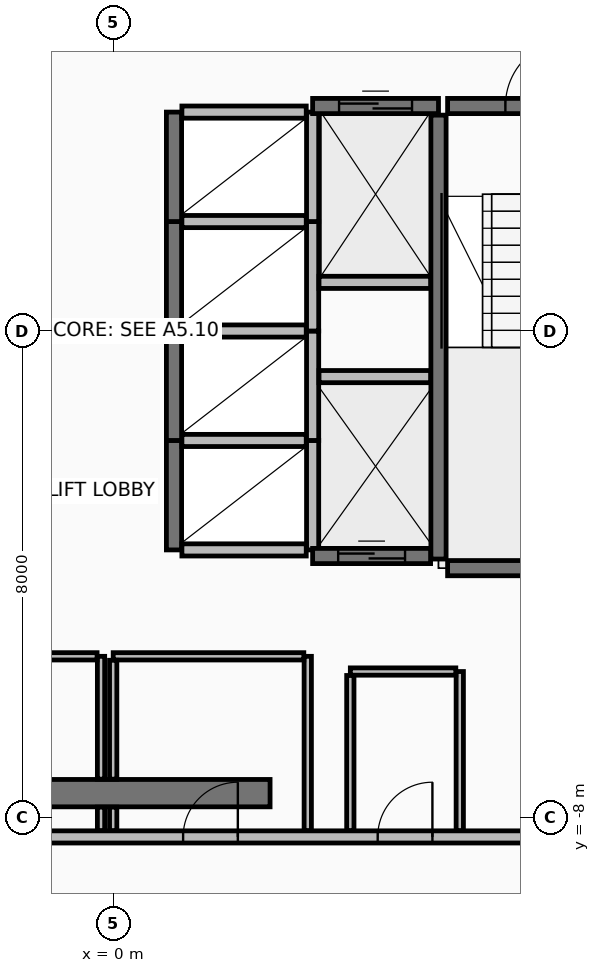
"""IFC4 building model, lengths in metres.
Left out: names, types, materials, properties, quantities, classifications, styles, units other than length and angle.
Written with IfcOpenShell. Run it as: python <this file> out.ifc"""

import sys

from ifc_helpers import new_model, si_unit, direction, frame, frame_2d, origin, place, context, subcontext, project, spatial, rectangle, extrude, element, fill, save


model = new_model("IFC4")
c1 = context("Model", 3, precision=1e-05, world=origin(), true_north=direction((0.0, 1.0)))
c2 = subcontext(c1, "Body", "Model", "MODEL_VIEW")
j1 = project(units=[si_unit("LENGTHUNIT", "METRE"), si_unit("PLANEANGLEUNIT", "RADIAN")], contexts=[c1])
p1 = place(None, origin())
s1 = spatial("IfcSite", under=j1, at=p1, CompositionType="ELEMENT")
p2 = place(p1, origin())
s2 = spatial("IfcBuilding", under=s1, at=p2, CompositionType="ELEMENT")
p3 = place(p2, frame((0.0, 0.0, 218.45)))
s3 = spatial("IfcBuildingStorey", under=s2, at=p3, CompositionType="ELEMENT", Elevation=218.45)
p4 = place(p3, frame((-2.8, -7.6, 0.0), z_axis=(0.0, 0.0, 1.0), x_axis=(1.0, 0.0, 0.0)))
e1 = element("IfcWall", 1, at=p4, inside=s3, PredefinedType="SHEAR", context=c2, shape_type="SweptSolid", body=[
    extrude(rectangle(XDim=5.38, YDim=0.45, at=frame_2d((2.69, 0.0))), origin(), (0.0, 0.0, 1.0), 3.36),
])
p5 = place(p3, frame((-9.62, -8.32, 0.0), z_axis=(0.0, 0.0, 1.0), x_axis=(1.0, 0.0, 0.0)))
e2 = element("IfcWall", 2, at=p5, inside=s3, PredefinedType="PARTITIONING", context=c2, shape_type="SweptSolid", body=[
    extrude(rectangle(XDim=19.24, YDim=0.2, at=frame_2d((9.62, 0.0))), origin(), (0.0, 0.0, 1.0), 2.805),
])
p6 = place(p5, frame((7.37, 0.0, 0.0)))
e3 = element("IfcOpeningElement", 3, at=p6, cuts=e2, PredefinedType="OPENING", context=c2, shape_type="SweptSolid", body=[
    extrude(rectangle(XDim=0.9, YDim=2.1, at=frame_2d((0.45, 1.05))), frame((0.0, 0.11, 0.0), z_axis=(0.0, -1.0, 0.0), x_axis=(1.0, 0.0, 0.0)), (0.0, 0.0, 1.0), 0.22),
])
p7 = place(p5, frame((10.77, 0.0, 0.0)))
e4 = element("IfcOpeningElement", 4, at=p7, cuts=e2, PredefinedType="OPENING", context=c2, shape_type="SweptSolid", body=[
    extrude(rectangle(XDim=0.9, YDim=2.1, at=frame_2d((0.45, 1.05))), frame((0.0, 0.11, 0.0), z_axis=(0.0, -1.0, 0.0), x_axis=(1.0, 0.0, 0.0)), (0.0, 0.0, 1.0), 0.22),
])
p8 = place(p5, frame((13.97, 0.0, 0.0)))
e5 = element("IfcOpeningElement", 5, at=p8, cuts=e2, PredefinedType="OPENING", context=c2, shape_type="SweptSolid", body=[
    extrude(rectangle(XDim=0.9, YDim=2.1, at=frame_2d((0.45, 1.05))), frame((0.0, 0.11, 0.0), z_axis=(0.0, -1.0, 0.0), x_axis=(1.0, 0.0, 0.0)), (0.0, 0.0, 1.0), 0.22),
])
p9 = place(p3, frame((5.35, -3.75, 0.0), z_axis=(0.0, 0.0, 1.0), x_axis=(0.0, 1.0, 0.0)))
e6 = element("IfcWall", 6, at=p9, inside=s3, PredefinedType="SHEAR", context=c2, shape_type="SweptSolid", body=[
    extrude(rectangle(XDim=7.3, YDim=0.25, at=frame_2d((3.65, 0.0))), origin(), (0.0, 0.0, 1.0), 3.36),
])
p10 = place(p3, frame((5.5, 3.7, 0.0), z_axis=(0.0, 0.0, 1.0), x_axis=(1.0, 0.0, 0.0)))
e7 = element("IfcWall", 7, at=p10, inside=s3, PredefinedType="SHEAR", context=c2, shape_type="SweptSolid", body=[
    extrude(rectangle(XDim=3.0, YDim=0.25, at=frame_2d((1.5, 0.0))), origin(), (0.0, 0.0, 1.0), 3.36),
])
p11 = place(p10, frame((0.95, 0.0, 0.0)))
e8 = element("IfcOpeningElement", 8, at=p11, cuts=e7, PredefinedType="OPENING", context=c2, shape_type="SweptSolid", body=[
    extrude(rectangle(XDim=1.1, YDim=2.15, at=frame_2d((0.55, 1.075))), frame((0.0, 0.135, 0.0), z_axis=(0.0, -1.0, 0.0), x_axis=(1.0, 0.0, 0.0)), (0.0, 0.0, 1.0), 0.27),
])
p12 = place(p3, frame((5.5, -3.9, 0.0), z_axis=(0.0, 0.0, 1.0), x_axis=(1.0, 0.0, 0.0)))
e9 = element("IfcWall", 9, at=p12, inside=s3, PredefinedType="SHEAR", context=c2, shape_type="SweptSolid", body=[
    extrude(rectangle(XDim=3.0, YDim=0.25, at=frame_2d((1.5, 0.0))), origin(), (0.0, 0.0, 1.0), 3.36),
])
p13 = place(p3, frame((1.0, -3.6, 0.0), z_axis=(0.0, 0.0, 1.0), x_axis=(0.0, 1.0, 0.0)))
e10 = element("IfcWall", 10, at=p13, inside=s3, PredefinedType="SHEAR", context=c2, shape_type="SweptSolid", body=[
    extrude(rectangle(XDim=1.8, YDim=0.25, at=frame_2d((0.9, 0.0))), origin(), (0.0, 0.0, 1.0), 3.36),
])
p14 = place(p3, frame((3.28, -3.6, 0.0), z_axis=(0.0, 0.0, 1.0), x_axis=(0.0, 1.0, 0.0)))
e11 = element("IfcWall", 11, at=p14, inside=s3, PredefinedType="PARTITIONING", context=c2, shape_type="SweptSolid", body=[
    extrude(rectangle(XDim=1.8, YDim=0.2, at=frame_2d((0.9, 0.0))), origin(), (0.0, 0.0, 1.0), 3.36),
])
for number, where, z_axis, x_axis in (
    (12, (1.13, -3.6, 0.0), (0.0, 0.0, 1.0), (1.0, 0.0, 0.0)),
    (13, (1.13, -1.8, 0.0), (0.0, 0.0, 1.0), (1.0, 0.0, 0.0)),
):
    element("IfcWall", number, at=place(p3, frame(where, z_axis=z_axis, x_axis=x_axis)), inside=s3, PredefinedType="PARTITIONING", context=c2, shape_type="SweptSolid", body=[
        extrude(rectangle(XDim=2.045, YDim=0.2, at=frame_2d((1.022, 0.0))), origin(), (0.0, 0.0, 1.0), 3.36),
    ])
p15 = place(p3, frame((1.0, -1.8, 0.0), z_axis=(0.0, 0.0, 1.0), x_axis=(0.0, 1.0, 0.0)))
e14 = element("IfcWall", 14, at=p15, inside=s3, PredefinedType="SHEAR", context=c2, shape_type="SweptSolid", body=[
    extrude(rectangle(XDim=1.8, YDim=0.25, at=frame_2d((0.9, 0.0))), origin(), (0.0, 0.0, 1.0), 3.36),
])
p16 = place(p3, frame((3.28, -1.8, 0.0), z_axis=(0.0, 0.0, 1.0), x_axis=(0.0, 1.0, 0.0)))
e15 = element("IfcWall", 15, at=p16, inside=s3, PredefinedType="PARTITIONING", context=c2, shape_type="SweptSolid", body=[
    extrude(rectangle(XDim=1.8, YDim=0.2, at=frame_2d((0.9, 0.0))), origin(), (0.0, 0.0, 1.0), 3.36),
])
p17 = place(p3, frame((1.13, 0.0, 0.0), z_axis=(0.0, 0.0, 1.0), x_axis=(1.0, 0.0, 0.0)))
e16 = element("IfcWall", 16, at=p17, inside=s3, PredefinedType="PARTITIONING", context=c2, shape_type="SweptSolid", body=[
    extrude(rectangle(XDim=2.045, YDim=0.2, at=frame_2d((1.022, 0.0))), origin(), (0.0, 0.0, 1.0), 3.36),
])
p18 = place(p3, frame((1.0, 0.0, 0.0), z_axis=(0.0, 0.0, 1.0), x_axis=(0.0, 1.0, 0.0)))
e17 = element("IfcWall", 17, at=p18, inside=s3, PredefinedType="SHEAR", context=c2, shape_type="SweptSolid", body=[
    extrude(rectangle(XDim=1.8, YDim=0.25, at=frame_2d((0.9, 0.0))), origin(), (0.0, 0.0, 1.0), 3.36),
])
p19 = place(p3, frame((3.28, 0.0, 0.0), z_axis=(0.0, 0.0, 1.0), x_axis=(0.0, 1.0, 0.0)))
e18 = element("IfcWall", 18, at=p19, inside=s3, PredefinedType="PARTITIONING", context=c2, shape_type="SweptSolid", body=[
    extrude(rectangle(XDim=1.8, YDim=0.2, at=frame_2d((0.9, 0.0))), origin(), (0.0, 0.0, 1.0), 3.36),
])
p20 = place(p3, frame((1.13, 1.8, 0.0), z_axis=(0.0, 0.0, 1.0), x_axis=(1.0, 0.0, 0.0)))
e19 = element("IfcWall", 19, at=p20, inside=s3, PredefinedType="PARTITIONING", context=c2, shape_type="SweptSolid", body=[
    extrude(rectangle(XDim=2.045, YDim=0.2, at=frame_2d((1.022, 0.0))), origin(), (0.0, 0.0, 1.0), 3.36),
])
p21 = place(p3, frame((1.0, 1.8, 0.0), z_axis=(0.0, 0.0, 1.0), x_axis=(0.0, 1.0, 0.0)))
e20 = element("IfcWall", 20, at=p21, inside=s3, PredefinedType="SHEAR", context=c2, shape_type="SweptSolid", body=[
    extrude(rectangle(XDim=1.8, YDim=0.25, at=frame_2d((0.9, 0.0))), origin(), (0.0, 0.0, 1.0), 3.36),
])
p22 = place(p3, frame((3.28, 1.8, 0.0), z_axis=(0.0, 0.0, 1.0), x_axis=(0.0, 1.0, 0.0)))
e21 = element("IfcWall", 21, at=p22, inside=s3, PredefinedType="PARTITIONING", context=c2, shape_type="SweptSolid", body=[
    extrude(rectangle(XDim=1.8, YDim=0.2, at=frame_2d((0.9, 0.0))), origin(), (0.0, 0.0, 1.0), 3.36),
])
p23 = place(p3, frame((1.13, 3.6, 0.0), z_axis=(0.0, 0.0, 1.0), x_axis=(1.0, 0.0, 0.0)))
e22 = element("IfcWall", 22, at=p23, inside=s3, PredefinedType="PARTITIONING", context=c2, shape_type="SweptSolid", body=[
    extrude(rectangle(XDim=2.045, YDim=0.2, at=frame_2d((1.022, 0.0))), origin(), (0.0, 0.0, 1.0), 2.655),
])
p24 = place(p3, frame((3.28, 3.7, 0.0), z_axis=(0.0, 0.0, 1.0), x_axis=(1.0, 0.0, 0.0)))
e23 = element("IfcWall", 23, at=p24, inside=s3, PredefinedType="SHEAR", context=c2, shape_type="SweptSolid", body=[
    extrude(rectangle(XDim=2.07, YDim=0.25, at=frame_2d((1.035, 0.0))), origin(), (0.0, 0.0, 1.0), 3.36),
])
p25 = place(p24, frame((0.435, 0.0, 0.0)))
e24 = element("IfcOpeningElement", 24, at=p25, cuts=e23, PredefinedType="OPENING", context=c2, shape_type="SweptSolid", body=[
    extrude(rectangle(XDim=1.2, YDim=2.2, at=frame_2d((0.6, 1.1))), frame((0.0, 0.135, 0.0), z_axis=(0.0, -1.0, 0.0), x_axis=(1.0, 0.0, 0.0)), (0.0, 0.0, 1.0), 0.27),
])
p26 = place(p3, frame((3.385, 0.8, 0.0), z_axis=(0.0, 0.0, 1.0), x_axis=(1.0, 0.0, 0.0)))
e25 = element("IfcWall", 25, at=p26, inside=s3, PredefinedType="PARTITIONING", context=c2, shape_type="SweptSolid", body=[
    extrude(rectangle(XDim=1.835, YDim=0.2, at=frame_2d((0.917, 0.0))), origin(), (0.0, 0.0, 1.0), 3.36),
])
p27 = place(p3, frame((3.28, -3.7, 0.0), z_axis=(0.0, 0.0, 1.0), x_axis=(1.0, 0.0, 0.0)))
e26 = element("IfcWall", 26, at=p27, inside=s3, PredefinedType="SHEAR", context=c2, shape_type="SweptSolid", body=[
    extrude(rectangle(XDim=1.94, YDim=0.25, at=frame_2d((0.97, 0.0))), origin(), (0.0, 0.0, 1.0), 3.36),
])
p28 = place(p27, frame((0.42, 0.0, 0.0)))
e27 = element("IfcOpeningElement", 27, at=p28, cuts=e26, PredefinedType="OPENING", context=c2, shape_type="SweptSolid", body=[
    extrude(rectangle(XDim=1.1, YDim=2.2, at=frame_2d((0.55, 1.1))), frame((0.0, 0.135, 0.0), z_axis=(0.0, -1.0, 0.0), x_axis=(1.0, 0.0, 0.0)), (0.0, 0.0, 1.0), 0.27),
])
p29 = place(p3, frame((3.385, -0.75, 0.0), z_axis=(0.0, 0.0, 1.0), x_axis=(1.0, 0.0, 0.0)))
e28 = element("IfcWall", 28, at=p29, inside=s3, PredefinedType="PARTITIONING", context=c2, shape_type="SweptSolid", body=[
    extrude(rectangle(XDim=1.835, YDim=0.2, at=frame_2d((0.917, 0.0))), origin(), (0.0, 0.0, 1.0), 3.36),
])
p30 = place(p3, frame((-0.2, -8.215, 0.0), z_axis=(0.0, 0.0, 1.0), x_axis=(0.0, 1.0, 0.0)))
e29 = element("IfcWall", 29, at=p30, inside=s3, PredefinedType="PARTITIONING", context=c2, shape_type="SweptSolid", body=[
    extrude(rectangle(XDim=0.385, YDim=0.12, at=frame_2d((0.192, 0.0))), origin(), (0.0, 0.0, 1.0), 2.655),
])
p31 = place(p3, frame((-0.2, -7.37, 0.0), z_axis=(0.0, 0.0, 1.0), x_axis=(0.0, 1.0, 0.0)))
e30 = element("IfcWall", 30, at=p31, inside=s3, PredefinedType="PARTITIONING", context=c2, shape_type="SweptSolid", body=[
    extrude(rectangle(XDim=2.02, YDim=0.12, at=frame_2d((1.01, 0.0))), origin(), (0.0, 0.0, 1.0), 2.655),
])
p32 = place(p3, frame((-0.265, -5.35, 0.0), z_axis=(0.0, 0.0, 1.0), x_axis=(-1.0, 0.0, 0.0)))
e31 = element("IfcWall", 31, at=p32, inside=s3, PredefinedType="PARTITIONING", context=c2, shape_type="SweptSolid", body=[
    extrude(rectangle(XDim=3.135, YDim=0.12, at=frame_2d((1.567, 0.0))), origin(), (0.0, 0.0, 1.0), 2.655),
])
p33 = place(p3, frame((3.2, -8.215, 0.0), z_axis=(0.0, 0.0, 1.0), x_axis=(0.0, 1.0, 0.0)))
e32 = element("IfcWall", 32, at=p33, inside=s3, PredefinedType="PARTITIONING", context=c2, shape_type="SweptSolid", body=[
    extrude(rectangle(XDim=2.865, YDim=0.12, at=frame_2d((1.433, 0.0))), origin(), (0.0, 0.0, 1.0), 2.655),
])
p34 = place(p3, frame((3.135, -5.35, 0.0), z_axis=(0.0, 0.0, 1.0), x_axis=(-1.0, 0.0, 0.0)))
e33 = element("IfcWall", 33, at=p34, inside=s3, PredefinedType="PARTITIONING", context=c2, shape_type="SweptSolid", body=[
    extrude(rectangle(XDim=3.135, YDim=0.12, at=frame_2d((1.567, 0.0))), origin(), (0.0, 0.0, 1.0), 3.36),
])
p35 = place(p3, frame((0.0, -5.415, 0.0), z_axis=(0.0, 0.0, 1.0), x_axis=(0.0, -1.0, 0.0)))
e34 = element("IfcWall", 34, at=p35, inside=s3, PredefinedType="PARTITIONING", context=c2, shape_type="SweptSolid", body=[
    extrude(rectangle(XDim=1.955, YDim=0.12, at=frame_2d((0.978, 0.0))), origin(), (0.0, 0.0, 1.0), 2.655),
])
p36 = place(p3, frame((0.0, -7.83, 0.0), z_axis=(0.0, 0.0, 1.0), x_axis=(0.0, -1.0, 0.0)))
e35 = element("IfcWall", 35, at=p36, inside=s3, PredefinedType="PARTITIONING", context=c2, shape_type="SweptSolid", body=[
    extrude(rectangle(XDim=0.385, YDim=0.12, at=frame_2d((0.192, 0.0))), origin(), (0.0, 0.0, 1.0), 2.655),
])
p37 = place(p3, frame((5.7, -8.215, 0.0), z_axis=(0.0, 0.0, 1.0), x_axis=(0.0, 1.0, 0.0)))
e36 = element("IfcWall", 36, at=p37, inside=s3, PredefinedType="PARTITIONING", context=c2, shape_type="SweptSolid", body=[
    extrude(rectangle(XDim=2.615, YDim=0.12, at=frame_2d((1.308, 0.0))), origin(), (0.0, 0.0, 1.0), 2.655),
])
p38 = place(p3, frame((5.635, -5.6, 0.0), z_axis=(0.0, 0.0, 1.0), x_axis=(-1.0, 0.0, 0.0)))
e37 = element("IfcWall", 37, at=p38, inside=s3, PredefinedType="PARTITIONING", context=c2, shape_type="SweptSolid", body=[
    extrude(rectangle(XDim=1.735, YDim=0.12, at=frame_2d((0.868, 0.0))), origin(), (0.0, 0.0, 1.0), 3.36),
])
p39 = place(p3, frame((3.9, -5.665, 0.0), z_axis=(0.0, 0.0, 1.0), x_axis=(0.0, -1.0, 0.0)))
e38 = element("IfcWall", 38, at=p39, inside=s3, PredefinedType="PARTITIONING", context=c2, shape_type="SweptSolid", body=[
    extrude(rectangle(XDim=2.55, YDim=0.12, at=frame_2d((1.275, 0.0))), origin(), (0.0, 0.0, 1.0), 2.655),
])
p40 = place(p11, frame((1.1, 0.0, 0.0), z_axis=(0.0, 0.0, 1.0), x_axis=(-1.0, 0.0, 0.0)))
e39 = element("IfcDoor", 39, at=p40, inside=s3, OperationType="SINGLE_SWING_LEFT", PredefinedType="DOOR", context=c2, shape_type="SweptSolid", body=[
    extrude(rectangle(XDim=1.1, YDim=2.15, at=frame_2d((0.55, 1.075))), frame((0.0, 0.025, 0.0), z_axis=(0.0, -1.0, 0.0), x_axis=(1.0, 0.0, 0.0)), (0.0, 0.0, 1.0), 0.05),
])
fill(e8, e39)
p41 = place(p25, origin())
e40 = element("IfcDoor", 40, at=p41, inside=s3, OperationType="SLIDING_TO_RIGHT", PredefinedType="DOOR", context=c2, shape_type="SweptSolid", body=[
    extrude(rectangle(XDim=1.2, YDim=2.2, at=frame_2d((0.6, 1.1))), frame((0.0, 0.025, 0.0), z_axis=(0.0, -1.0, 0.0), x_axis=(1.0, 0.0, 0.0)), (0.0, 0.0, 1.0), 0.05),
])
fill(e24, e40)
p42 = place(p28, origin())
e41 = element("IfcDoor", 41, at=p42, inside=s3, OperationType="SLIDING_TO_LEFT", PredefinedType="DOOR", context=c2, shape_type="SweptSolid", body=[
    extrude(rectangle(XDim=1.1, YDim=2.2, at=frame_2d((0.55, 1.1))), frame((0.0, 0.025, 0.0), z_axis=(0.0, -1.0, 0.0), x_axis=(1.0, 0.0, 0.0)), (0.0, 0.0, 1.0), 0.05),
])
fill(e27, e41)
p43 = place(p7, frame((0.9, 0.0, 0.0), z_axis=(0.0, 0.0, 1.0), x_axis=(-1.0, 0.0, 0.0)))
e42 = element("IfcDoor", 42, at=p43, inside=s3, OperationType="SINGLE_SWING_LEFT", PredefinedType="DOOR", context=c2, shape_type="SweptSolid", body=[
    extrude(rectangle(XDim=0.9, YDim=2.1, at=frame_2d((0.45, 1.05))), frame((0.0, 0.025, 0.0), z_axis=(0.0, -1.0, 0.0), x_axis=(1.0, 0.0, 0.0)), (0.0, 0.0, 1.0), 0.05),
])
fill(e4, e42)
p44 = place(p8, frame((0.9, 0.0, 0.0), z_axis=(0.0, 0.0, 1.0), x_axis=(-1.0, 0.0, 0.0)))
e43 = element("IfcDoor", 43, at=p44, inside=s3, OperationType="SINGLE_SWING_LEFT", PredefinedType="DOOR", context=c2, shape_type="SweptSolid", body=[
    extrude(rectangle(XDim=0.9, YDim=2.1, at=frame_2d((0.45, 1.05))), frame((0.0, 0.025, 0.0), z_axis=(0.0, -1.0, 0.0), x_axis=(1.0, 0.0, 0.0)), (0.0, 0.0, 1.0), 0.05),
])
fill(e5, e43)
save(model, sys.argv[1])
